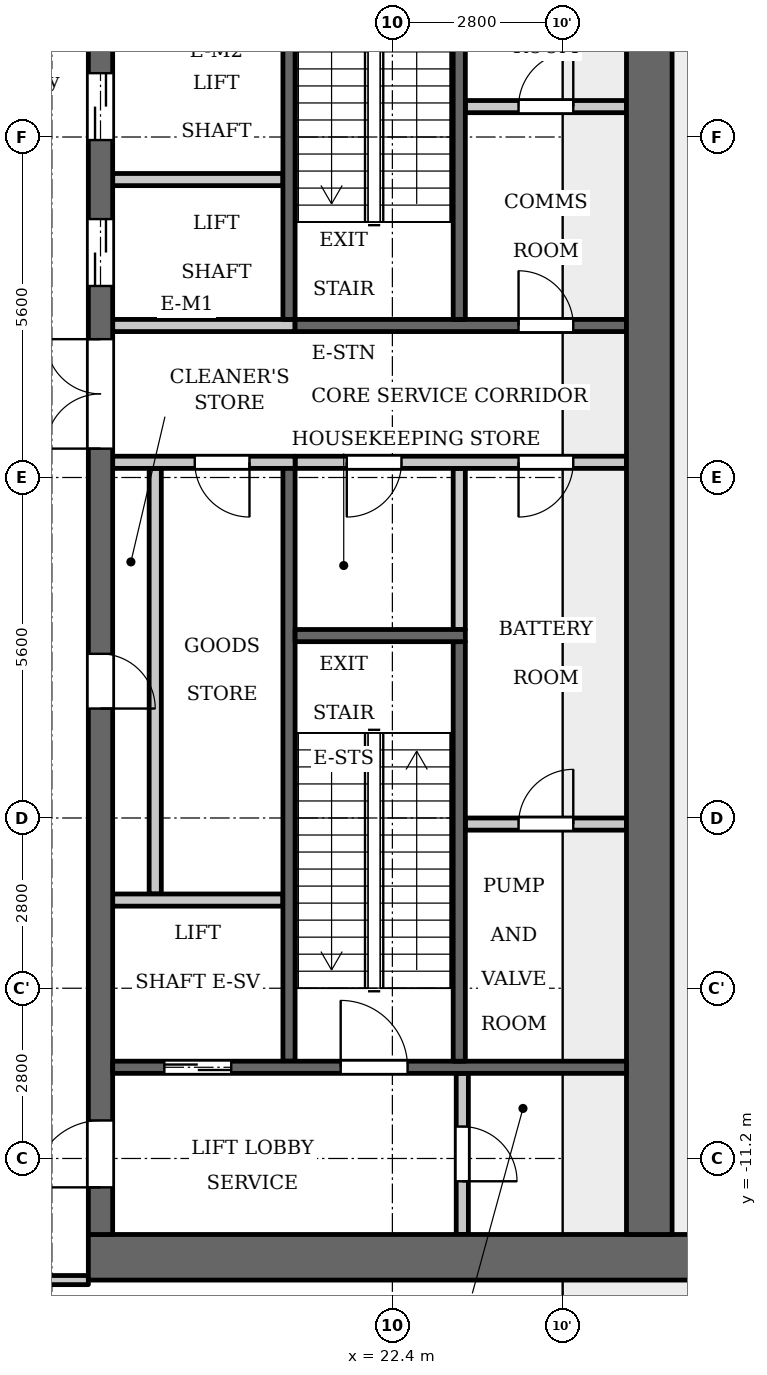
"""IFC4 building model, lengths in metres.
Left out: names, types, materials, properties, quantities, classifications, styles, units other than length and angle.
Written with IfcOpenShell. Run it as: python <this file> out.ifc"""

import sys

from ifc_helpers import new_model, si_unit, direction, frame, frame_2d, origin, place, context, subcontext, project, spatial, rectangle, extrude, element, fill, save


model = new_model("IFC4")
c1 = context("Model", 3, precision=1e-05, world=origin(), true_north=direction((0.0, 1.0)))
c2 = subcontext(c1, "Body", "Model", "MODEL_VIEW")
j1 = project(units=[si_unit("LENGTHUNIT", "METRE"), si_unit("PLANEANGLEUNIT", "RADIAN")], contexts=[c1])
p1 = place(None, origin())
s1 = spatial("IfcSite", under=j1, at=p1, CompositionType="ELEMENT")
p2 = place(p1, origin())
s2 = spatial("IfcBuilding", under=s1, at=p2, CompositionType="ELEMENT")
p3 = place(p2, frame((0.0, 0.0, 183.5)))
s3 = spatial("IfcBuildingStorey", under=s2, at=p3, CompositionType="ELEMENT", Elevation=183.5)
p4 = place(p3, frame((23.5, -2.5, 0.0), z_axis=(0.0, 0.0, 1.0), x_axis=(0.0, 1.0, 0.0)))
e1 = element("IfcWall", 1, at=p4, inside=s3, PredefinedType="PARTITIONING", context=c2, shape_type="SweptSolid", body=[
    extrude(rectangle(XDim=2.65, YDim=0.2, at=frame_2d((1.325, 0.0))), origin(), (0.0, 0.0, 1.0), 4.6),
])
p5 = place(p3, frame((20.7, 2.6, 0.0), z_axis=(0.0, 0.0, 1.0), x_axis=(0.0, 1.0, 0.0)))
e2 = element("IfcWall", 2, at=p5, inside=s3, PredefinedType="SHEAR", context=c2, shape_type="SweptSolid", body=[
    extrude(rectangle(XDim=7.0, YDim=0.2, at=frame_2d((3.5, 0.0))), origin(), (0.0, 0.0, 1.0), 4.6),
])
p6 = place(p3, frame((20.7, -9.6, 0.0), z_axis=(0.0, 0.0, 1.0), x_axis=(0.0, 1.0, 0.0)))
e3 = element("IfcWall", 3, at=p6, inside=s3, PredefinedType="SHEAR", context=c2, shape_type="SweptSolid", body=[
    extrude(rectangle(XDim=9.75, YDim=0.2, at=frame_2d((4.875, 0.0))), origin(), (0.0, 0.0, 1.0), 4.6),
])
p7 = place(p3, frame((20.8, 2.5, 0.0), z_axis=(0.0, 0.0, 1.0), x_axis=(1.0, 0.0, 0.0)))
e4 = element("IfcWall", 4, at=p7, inside=s3, PredefinedType="SHEAR", context=c2, shape_type="SweptSolid", body=[
    extrude(rectangle(XDim=5.45, YDim=0.2, at=frame_2d((2.725, 0.0))), origin(), (0.0, 0.0, 1.0), 4.6),
])
p8 = place(p7, frame((3.675, 0.0, 0.0)))
e5 = element("IfcOpeningElement", 5, at=p8, cuts=e4, PredefinedType="OPENING", context=c2, shape_type="SweptSolid", body=[
    extrude(rectangle(XDim=0.9, YDim=2.1, at=frame_2d((0.45, 1.05))), frame((0.0, 0.11, 0.0), z_axis=(0.0, -1.0, 0.0), x_axis=(1.0, 0.0, 0.0)), (0.0, 0.0, 1.0), 0.22),
])
p9 = place(p3, frame((20.8, 0.25, 0.0), z_axis=(0.0, 0.0, 1.0), x_axis=(1.0, 0.0, 0.0)))
e6 = element("IfcWall", 6, at=p9, inside=s3, PredefinedType="PARTITIONING", context=c2, shape_type="SweptSolid", body=[
    extrude(rectangle(XDim=5.45, YDim=0.2, at=frame_2d((2.725, 0.0))), origin(), (0.0, 0.0, 1.0), 4.6),
])
p10 = place(p9, frame((0.85, 0.0, 0.0)))
e7 = element("IfcOpeningElement", 7, at=p10, cuts=e6, PredefinedType="OPENING", context=c2, shape_type="SweptSolid", body=[
    extrude(rectangle(XDim=0.9, YDim=2.1, at=frame_2d((0.45, 1.05))), frame((0.0, 0.11, 0.0), z_axis=(0.0, -1.0, 0.0), x_axis=(1.0, 0.0, 0.0)), (0.0, 0.0, 1.0), 0.22),
])
p11 = place(p9, frame((3.675, 0.0, 0.0)))
e8 = element("IfcOpeningElement", 8, at=p11, cuts=e6, PredefinedType="OPENING", context=c2, shape_type="SweptSolid", body=[
    extrude(rectangle(XDim=0.9, YDim=2.1, at=frame_2d((0.45, 1.05))), frame((0.0, 0.11, 0.0), z_axis=(0.0, -1.0, 0.0), x_axis=(1.0, 0.0, 0.0)), (0.0, 0.0, 1.0), 0.22),
])
p12 = place(p3, frame((17.4, -12.825, 0.0), z_axis=(0.0, 0.0, 1.0), x_axis=(1.0, 0.0, 0.0)))
e9 = element("IfcWall", 9, at=p12, inside=s3, PredefinedType="SHEAR", context=c2, shape_type="SweptSolid", body=[
    extrude(rectangle(XDim=10.4, YDim=0.75, at=frame_2d((5.2, 0.0))), origin(), (0.0, 0.0, 1.0), 4.6),
])
p13 = place(p3, frame((18.5, -6.85, 0.0), z_axis=(0.0, 0.0, 1.0), x_axis=(0.0, 1.0, 0.0)))
e10 = element("IfcWall", 10, at=p13, inside=s3, PredefinedType="PARTITIONING", context=c2, shape_type="SweptSolid", body=[
    extrude(rectangle(XDim=7.0, YDim=0.2, at=frame_2d((3.5, 0.0))), origin(), (0.0, 0.0, 1.0), 4.6),
])
p14 = place(p3, frame((17.6, -12.45, 0.0), z_axis=(0.0, 0.0, 1.0), x_axis=(0.0, 1.0, 0.0)))
e11 = element("IfcWall", 11, at=p14, inside=s3, PredefinedType="SHEAR", context=c2, shape_type="SweptSolid", body=[
    extrude(rectangle(XDim=24.9, YDim=0.4, at=frame_2d((12.45, 0.0))), origin(), (0.0, 0.0, 1.0), 4.6),
])
p15 = place(p14, frame((8.65, 0.0, 0.0)))
e12 = element("IfcOpeningElement", 12, at=p15, cuts=e11, PredefinedType="OPENING", context=c2, shape_type="SweptSolid", body=[
    extrude(rectangle(XDim=0.9, YDim=2.1, at=frame_2d((0.45, 1.05))), frame((0.0, 0.21, 0.0), z_axis=(0.0, -1.0, 0.0), x_axis=(1.0, 0.0, 0.0)), (0.0, 0.0, 1.0), 0.42),
])
p16 = place(p14, frame((15.6, 0.0, 0.0)))
e13 = element("IfcOpeningElement", 13, at=p16, cuts=e11, PredefinedType="OPENING", context=c2, shape_type="SweptSolid", body=[
    extrude(rectangle(XDim=1.1, YDim=2.1, at=frame_2d((0.55, 1.05))), frame((0.0, 0.21, 0.0), z_axis=(0.0, -1.0, 0.0), x_axis=(1.0, 0.0, 0.0)), (0.0, 0.0, 1.0), 0.42),
])
p17 = place(p14, frame((18.0, 0.0, 0.0)))
e14 = element("IfcOpeningElement", 14, at=p17, cuts=e11, PredefinedType="OPENING", context=c2, shape_type="SweptSolid", body=[
    extrude(rectangle(XDim=1.1, YDim=2.1, at=frame_2d((0.55, 1.05))), frame((0.0, 0.21, 0.0), z_axis=(0.0, -1.0, 0.0), x_axis=(1.0, 0.0, 0.0)), (0.0, 0.0, 1.0), 0.42),
])
p18 = place(p14, frame((23.025, 0.0, 0.0)))
e15 = element("IfcOpeningElement", 15, at=p18, cuts=e11, PredefinedType="OPENING", context=c2, shape_type="SweptSolid", body=[
    extrude(rectangle(XDim=1.1, YDim=2.1, at=frame_2d((0.55, 1.05))), frame((0.0, 0.21, 0.0), z_axis=(0.0, -1.0, 0.0), x_axis=(1.0, 0.0, 0.0)), (0.0, 0.0, 1.0), 0.42),
])
p19 = place(p14, frame((0.775, 0.0, 0.0)))
e16 = element("IfcOpeningElement", 16, at=p19, cuts=e11, PredefinedType="OPENING", context=c2, shape_type="SweptSolid", body=[
    extrude(rectangle(XDim=1.1, YDim=2.1, at=frame_2d((0.55, 1.05))), frame((0.0, 0.21, 0.0), z_axis=(0.0, -1.0, 0.0), x_axis=(1.0, 0.0, 0.0)), (0.0, 0.0, 1.0), 0.42),
])
p20 = place(p14, frame((12.925, 0.0, 0.0)))
e17 = element("IfcOpeningElement", 17, at=p20, cuts=e11, PredefinedType="OPENING", context=c2, shape_type="SweptSolid", body=[
    extrude(rectangle(XDim=1.8, YDim=2.1, at=frame_2d((0.9, 1.05))), frame((0.0, 0.21, 0.0), z_axis=(0.0, -1.0, 0.0), x_axis=(1.0, 0.0, 0.0)), (0.0, 0.0, 1.0), 0.42),
])
p21 = place(p3, frame((26.625, -12.45, 0.0), z_axis=(0.0, 0.0, 1.0), x_axis=(0.0, 1.0, 0.0)))
e18 = element("IfcWall", 18, at=p21, inside=s3, PredefinedType="SHEAR", context=c2, shape_type="SweptSolid", body=[
    extrude(rectangle(XDim=24.9, YDim=0.75, at=frame_2d((12.45, 0.0))), origin(), (0.0, 0.0, 1.0), 4.6),
])
p22 = place(p3, frame((23.55, -12.45, 0.0), z_axis=(0.0, 0.0, 1.0), x_axis=(0.0, 1.0, 0.0)))
e19 = element("IfcWall", 19, at=p22, inside=s3, PredefinedType="PARTITIONING", context=c2, shape_type="SweptSolid", body=[
    extrude(rectangle(XDim=2.65, YDim=0.2, at=frame_2d((1.325, 0.0))), origin(), (0.0, 0.0, 1.0), 4.6),
])
p23 = place(p22, frame((0.875, 0.0, 0.0)))
e20 = element("IfcOpeningElement", 20, at=p23, cuts=e19, PredefinedType="OPENING", context=c2, shape_type="SweptSolid", body=[
    extrude(rectangle(XDim=0.9, YDim=2.1, at=frame_2d((0.45, 1.05))), frame((0.0, 0.11, 0.0), z_axis=(0.0, -1.0, 0.0), x_axis=(1.0, 0.0, 0.0)), (0.0, 0.0, 1.0), 0.22),
])
p24 = place(p3, frame((23.6, -5.7, 0.0), z_axis=(0.0, 0.0, 1.0), x_axis=(1.0, 0.0, 0.0)))
e21 = element("IfcWall", 21, at=p24, inside=s3, PredefinedType="PARTITIONING", context=c2, shape_type="SweptSolid", body=[
    extrude(rectangle(XDim=2.65, YDim=0.2, at=frame_2d((1.325, 0.0))), origin(), (0.0, 0.0, 1.0), 4.6),
])
p25 = place(p24, frame((0.875, 0.0, 0.0)))
e22 = element("IfcOpeningElement", 22, at=p25, cuts=e21, PredefinedType="OPENING", context=c2, shape_type="SweptSolid", body=[
    extrude(rectangle(XDim=0.9, YDim=2.1, at=frame_2d((0.45, 1.05))), frame((0.0, 0.11, 0.0), z_axis=(0.0, -1.0, 0.0), x_axis=(1.0, 0.0, 0.0)), (0.0, 0.0, 1.0), 0.22),
])
p26 = place(p3, frame((23.6, 6.1, 0.0), z_axis=(0.0, 0.0, 1.0), x_axis=(1.0, 0.0, 0.0)))
e23 = element("IfcWall", 23, at=p26, inside=s3, PredefinedType="PARTITIONING", context=c2, shape_type="SweptSolid", body=[
    extrude(rectangle(XDim=2.65, YDim=0.2, at=frame_2d((1.325, 0.0))), origin(), (0.0, 0.0, 1.0), 4.6),
])
p27 = place(p26, frame((0.875, 0.0, 0.0)))
e24 = element("IfcOpeningElement", 24, at=p27, cuts=e23, PredefinedType="OPENING", context=c2, shape_type="SweptSolid", body=[
    extrude(rectangle(XDim=0.9, YDim=2.1, at=frame_2d((0.45, 1.05))), frame((0.0, 0.11, 0.0), z_axis=(0.0, -1.0, 0.0), x_axis=(1.0, 0.0, 0.0)), (0.0, 0.0, 1.0), 0.22),
])
p28 = place(p3, frame((17.8, -9.7, 0.0), z_axis=(0.0, 0.0, 1.0), x_axis=(1.0, 0.0, 0.0)))
e25 = element("IfcWall", 25, at=p28, inside=s3, PredefinedType="SHEAR", context=c2, shape_type="SweptSolid", body=[
    extrude(rectangle(XDim=8.45, YDim=0.2, at=frame_2d((4.225, 0.0))), origin(), (0.0, 0.0, 1.0), 4.6),
])
p29 = place(p28, frame((0.85, 0.0, 0.0)))
e26 = element("IfcOpeningElement", 26, at=p29, cuts=e25, PredefinedType="OPENING", context=c2, shape_type="SweptSolid", body=[
    extrude(rectangle(XDim=1.1, YDim=2.1, at=frame_2d((0.55, 1.05))), frame((0.0, 0.11, 0.0), z_axis=(0.0, -1.0, 0.0), x_axis=(1.0, 0.0, 0.0)), (0.0, 0.0, 1.0), 0.22),
])
p30 = place(p28, frame((3.75, 0.0, 0.0)))
e27 = element("IfcOpeningElement", 27, at=p30, cuts=e25, PredefinedType="OPENING", context=c2, shape_type="SweptSolid", body=[
    extrude(rectangle(XDim=1.1, YDim=2.1, at=frame_2d((0.55, 1.05))), frame((0.0, 0.11, 0.0), z_axis=(0.0, -1.0, 0.0), x_axis=(1.0, 0.0, 0.0)), (0.0, 0.0, 1.0), 0.22),
])
p31 = place(p3, frame((17.8, -6.95, 0.0), z_axis=(0.0, 0.0, 1.0), x_axis=(1.0, 0.0, 0.0)))
e28 = element("IfcWall", 28, at=p31, inside=s3, PredefinedType="PARTITIONING", context=c2, shape_type="SweptSolid", body=[
    extrude(rectangle(XDim=2.8, YDim=0.2, at=frame_2d((1.4, 0.0))), origin(), (0.0, 0.0, 1.0), 4.6),
])
p32 = place(p3, frame((17.8, 0.25, 0.0), z_axis=(0.0, 0.0, 1.0), x_axis=(1.0, 0.0, 0.0)))
e29 = element("IfcWall", 29, at=p32, inside=s3, PredefinedType="PARTITIONING", context=c2, shape_type="SweptSolid", body=[
    extrude(rectangle(XDim=3.0, YDim=0.2, at=frame_2d((1.5, 0.0))), origin(), (0.0, 0.0, 1.0), 4.6),
])
p33 = place(p32, frame((1.35, 0.0, 0.0)))
e30 = element("IfcOpeningElement", 30, at=p33, cuts=e29, PredefinedType="OPENING", context=c2, shape_type="SweptSolid", body=[
    extrude(rectangle(XDim=0.9, YDim=2.1, at=frame_2d((0.45, 1.05))), frame((0.0, 0.11, 0.0), z_axis=(0.0, -1.0, 0.0), x_axis=(1.0, 0.0, 0.0)), (0.0, 0.0, 1.0), 0.22),
])
p34 = place(p3, frame((17.8, 2.5, 0.0), z_axis=(0.0, 0.0, 1.0), x_axis=(1.0, 0.0, 0.0)))
e31 = element("IfcWall", 31, at=p34, inside=s3, PredefinedType="PARTITIONING", context=c2, shape_type="SweptSolid", body=[
    extrude(rectangle(XDim=3.0, YDim=0.2, at=frame_2d((1.5, 0.0))), origin(), (0.0, 0.0, 1.0), 4.6),
])
p35 = place(p3, frame((17.8, 4.9, 0.0), z_axis=(0.0, 0.0, 1.0), x_axis=(1.0, 0.0, 0.0)))
e32 = element("IfcWall", 32, at=p35, inside=s3, PredefinedType="PARTITIONING", context=c2, shape_type="SweptSolid", body=[
    extrude(rectangle(XDim=2.8, YDim=0.2, at=frame_2d((1.4, 0.0))), origin(), (0.0, 0.0, 1.0), 4.6),
])
p36 = place(p3, frame((23.5, 2.6, 0.0), z_axis=(0.0, 0.0, 1.0), x_axis=(0.0, 1.0, 0.0)))
e33 = element("IfcWall", 33, at=p36, inside=s3, PredefinedType="SHEAR", context=c2, shape_type="SweptSolid", body=[
    extrude(rectangle(XDim=7.0, YDim=0.2, at=frame_2d((3.5, 0.0))), origin(), (0.0, 0.0, 1.0), 4.6),
])
p37 = place(p3, frame((23.5, -9.6, 0.0), z_axis=(0.0, 0.0, 1.0), x_axis=(0.0, 1.0, 0.0)))
e34 = element("IfcWall", 34, at=p37, inside=s3, PredefinedType="SHEAR", context=c2, shape_type="SweptSolid", body=[
    extrude(rectangle(XDim=6.9, YDim=0.2, at=frame_2d((3.45, 0.0))), origin(), (0.0, 0.0, 1.0), 4.6),
])
p38 = place(p3, frame((20.8, -2.6, 0.0), z_axis=(0.0, 0.0, 1.0), x_axis=(1.0, 0.0, 0.0)))
e35 = element("IfcWall", 35, at=p38, inside=s3, PredefinedType="SHEAR", context=c2, shape_type="SweptSolid", body=[
    extrude(rectangle(XDim=2.8, YDim=0.2, at=frame_2d((1.4, 0.0))), origin(), (0.0, 0.0, 1.0), 4.6),
])
p39 = place(p3, frame((11.52, -13.2, 0.0), z_axis=(0.0, 0.0, 1.0), x_axis=(1.0, 0.0, 0.0)))
e36 = element("IfcWall", 36, at=p39, inside=s3, PredefinedType="PARTITIONING", context=c2, shape_type="SweptSolid", body=[
    extrude(rectangle(XDim=5.88, YDim=0.15, at=frame_2d((2.94, 0.0))), origin(), (0.0, 0.0, 1.0), 4.6),
])
p40 = place(p39, frame((4.13, 0.0, 0.0)))
e37 = element("IfcOpeningElement", 37, at=p40, cuts=e36, PredefinedType="OPENING", context=c2, shape_type="SweptSolid", body=[
    extrude(rectangle(XDim=1.0, YDim=2.1, at=frame_2d((0.5, 1.05))), frame((0.0, 0.085, 0.0), z_axis=(0.0, -1.0, 0.0), x_axis=(1.0, 0.0, 0.0)), (0.0, 0.0, 1.0), 0.17),
])
p41 = place(p39, frame((0.28, 0.0, 0.0)))
e38 = element("IfcOpeningElement", 38, at=p41, cuts=e36, PredefinedType="OPENING", context=c2, shape_type="SweptSolid", body=[
    extrude(rectangle(XDim=0.9, YDim=2.1, at=frame_2d((0.45, 1.05))), frame((0.0, 0.085, 0.0), z_axis=(0.0, -1.0, 0.0), x_axis=(1.0, 0.0, 0.0)), (0.0, 0.0, 1.0), 0.17),
])
p42 = place(p39, frame((2.18, 0.0, 0.0)))
e39 = element("IfcOpeningElement", 39, at=p42, cuts=e36, PredefinedType="OPENING", context=c2, shape_type="SweptSolid", body=[
    extrude(rectangle(XDim=0.9, YDim=2.1, at=frame_2d((0.45, 1.05))), frame((0.0, 0.085, 0.0), z_axis=(0.0, -1.0, 0.0), x_axis=(1.0, 0.0, 0.0)), (0.0, 0.0, 1.0), 0.17),
])
p43 = place(p29, origin())
e40 = element("IfcDoor", 40, at=p43, inside=s3, OperationType="DOUBLE_DOOR_SLIDING", PredefinedType="DOOR", context=c2, shape_type="SweptSolid", body=[
    extrude(rectangle(XDim=1.1, YDim=2.1, at=frame_2d((0.55, 1.05))), frame((0.0, 0.025, 0.0), z_axis=(0.0, -1.0, 0.0), x_axis=(1.0, 0.0, 0.0)), (0.0, 0.0, 1.0), 0.05),
])
fill(e26, e40)
p44 = place(p15, origin())
e41 = element("IfcDoor", 41, at=p44, inside=s3, OperationType="SINGLE_SWING_LEFT", PredefinedType="DOOR", context=c2, shape_type="SweptSolid", body=[
    extrude(rectangle(XDim=0.9, YDim=2.1, at=frame_2d((0.45, 1.05))), frame((0.0, 0.025, 0.0), z_axis=(0.0, -1.0, 0.0), x_axis=(1.0, 0.0, 0.0)), (0.0, 0.0, 1.0), 0.05),
])
fill(e12, e41)
p45 = place(p33, origin())
e42 = element("IfcDoor", 42, at=p45, inside=s3, OperationType="SINGLE_SWING_RIGHT", PredefinedType="DOOR", context=c2, shape_type="SweptSolid", body=[
    extrude(rectangle(XDim=0.9, YDim=2.1, at=frame_2d((0.45, 1.05))), frame((0.0, 0.025, 0.0), z_axis=(0.0, -1.0, 0.0), x_axis=(1.0, 0.0, 0.0)), (0.0, 0.0, 1.0), 0.05),
])
fill(e30, e42)
p46 = place(p16, origin())
e43 = element("IfcDoor", 43, at=p46, inside=s3, OperationType="DOUBLE_DOOR_SLIDING", PredefinedType="DOOR", context=c2, shape_type="SweptSolid", body=[
    extrude(rectangle(XDim=1.1, YDim=2.1, at=frame_2d((0.55, 1.05))), frame((0.0, 0.025, 0.0), z_axis=(0.0, -1.0, 0.0), x_axis=(1.0, 0.0, 0.0)), (0.0, 0.0, 1.0), 0.05),
])
fill(e13, e43)
p47 = place(p17, origin())
e44 = element("IfcDoor", 44, at=p47, inside=s3, OperationType="DOUBLE_DOOR_SLIDING", PredefinedType="DOOR", context=c2, shape_type="SweptSolid", body=[
    extrude(rectangle(XDim=1.1, YDim=2.1, at=frame_2d((0.55, 1.05))), frame((0.0, 0.025, 0.0), z_axis=(0.0, -1.0, 0.0), x_axis=(1.0, 0.0, 0.0)), (0.0, 0.0, 1.0), 0.05),
])
fill(e14, e44)
p48 = place(p19, origin())
e45 = element("IfcDoor", 45, at=p48, inside=s3, OperationType="SINGLE_SWING_RIGHT", PredefinedType="DOOR", context=c2, shape_type="SweptSolid", body=[
    extrude(rectangle(XDim=1.1, YDim=2.1, at=frame_2d((0.55, 1.05))), frame((0.0, 0.025, 0.0), z_axis=(0.0, -1.0, 0.0), x_axis=(1.0, 0.0, 0.0)), (0.0, 0.0, 1.0), 0.05),
])
fill(e16, e45)
p49 = place(p23, origin())
e46 = element("IfcDoor", 46, at=p49, inside=s3, OperationType="SINGLE_SWING_LEFT", PredefinedType="DOOR", context=c2, shape_type="SweptSolid", body=[
    extrude(rectangle(XDim=0.9, YDim=2.1, at=frame_2d((0.45, 1.05))), frame((0.0, 0.025, 0.0), z_axis=(0.0, -1.0, 0.0), x_axis=(1.0, 0.0, 0.0)), (0.0, 0.0, 1.0), 0.05),
])
fill(e20, e46)
p50 = place(p30, origin())
e47 = element("IfcDoor", 47, at=p50, inside=s3, OperationType="SINGLE_SWING_RIGHT", PredefinedType="DOOR", context=c2, shape_type="SweptSolid", body=[
    extrude(rectangle(XDim=1.1, YDim=2.1, at=frame_2d((0.55, 1.05))), frame((0.0, 0.025, 0.0), z_axis=(0.0, -1.0, 0.0), x_axis=(1.0, 0.0, 0.0)), (0.0, 0.0, 1.0), 0.05),
])
fill(e27, e47)
p51 = place(p20, origin())
e48 = element("IfcDoor", 48, at=p51, inside=s3, OperationType="DOUBLE_DOOR_SINGLE_SWING", PredefinedType="DOOR", context=c2, shape_type="SweptSolid", body=[
    extrude(rectangle(XDim=1.8, YDim=2.1, at=frame_2d((0.9, 1.05))), frame((0.0, 0.025, 0.0), z_axis=(0.0, -1.0, 0.0), x_axis=(1.0, 0.0, 0.0)), (0.0, 0.0, 1.0), 0.05),
])
fill(e17, e48)
p52 = place(p10, origin())
e49 = element("IfcDoor", 49, at=p52, inside=s3, OperationType="SINGLE_SWING_LEFT", PredefinedType="DOOR", context=c2, shape_type="SweptSolid", body=[
    extrude(rectangle(XDim=0.9, YDim=2.1, at=frame_2d((0.45, 1.05))), frame((0.0, 0.025, 0.0), z_axis=(0.0, -1.0, 0.0), x_axis=(1.0, 0.0, 0.0)), (0.0, 0.0, 1.0), 0.05),
])
fill(e7, e49)
p53 = place(p25, origin())
e50 = element("IfcDoor", 50, at=p53, inside=s3, OperationType="SINGLE_SWING_LEFT", PredefinedType="DOOR", context=c2, shape_type="SweptSolid", body=[
    extrude(rectangle(XDim=0.9, YDim=2.1, at=frame_2d((0.45, 1.05))), frame((0.0, 0.025, 0.0), z_axis=(0.0, -1.0, 0.0), x_axis=(1.0, 0.0, 0.0)), (0.0, 0.0, 1.0), 0.05),
])
fill(e22, e50)
p54 = place(p11, origin())
e51 = element("IfcDoor", 51, at=p54, inside=s3, OperationType="SINGLE_SWING_LEFT", PredefinedType="DOOR", context=c2, shape_type="SweptSolid", body=[
    extrude(rectangle(XDim=0.9, YDim=2.1, at=frame_2d((0.45, 1.05))), frame((0.0, 0.025, 0.0), z_axis=(0.0, -1.0, 0.0), x_axis=(1.0, 0.0, 0.0)), (0.0, 0.0, 1.0), 0.05),
])
fill(e8, e51)
p55 = place(p27, origin())
e52 = element("IfcDoor", 52, at=p55, inside=s3, OperationType="SINGLE_SWING_LEFT", PredefinedType="DOOR", context=c2, shape_type="SweptSolid", body=[
    extrude(rectangle(XDim=0.9, YDim=2.1, at=frame_2d((0.45, 1.05))), frame((0.0, 0.025, 0.0), z_axis=(0.0, -1.0, 0.0), x_axis=(1.0, 0.0, 0.0)), (0.0, 0.0, 1.0), 0.05),
])
fill(e24, e52)
p56 = place(p8, origin())
e53 = element("IfcDoor", 53, at=p56, inside=s3, OperationType="SINGLE_SWING_RIGHT", PredefinedType="DOOR", context=c2, shape_type="SweptSolid", body=[
    extrude(rectangle(XDim=0.9, YDim=2.1, at=frame_2d((0.45, 1.05))), frame((0.0, 0.025, 0.0), z_axis=(0.0, -1.0, 0.0), x_axis=(1.0, 0.0, 0.0)), (0.0, 0.0, 1.0), 0.05),
])
fill(e5, e53)
save(model, sys.argv[1])
